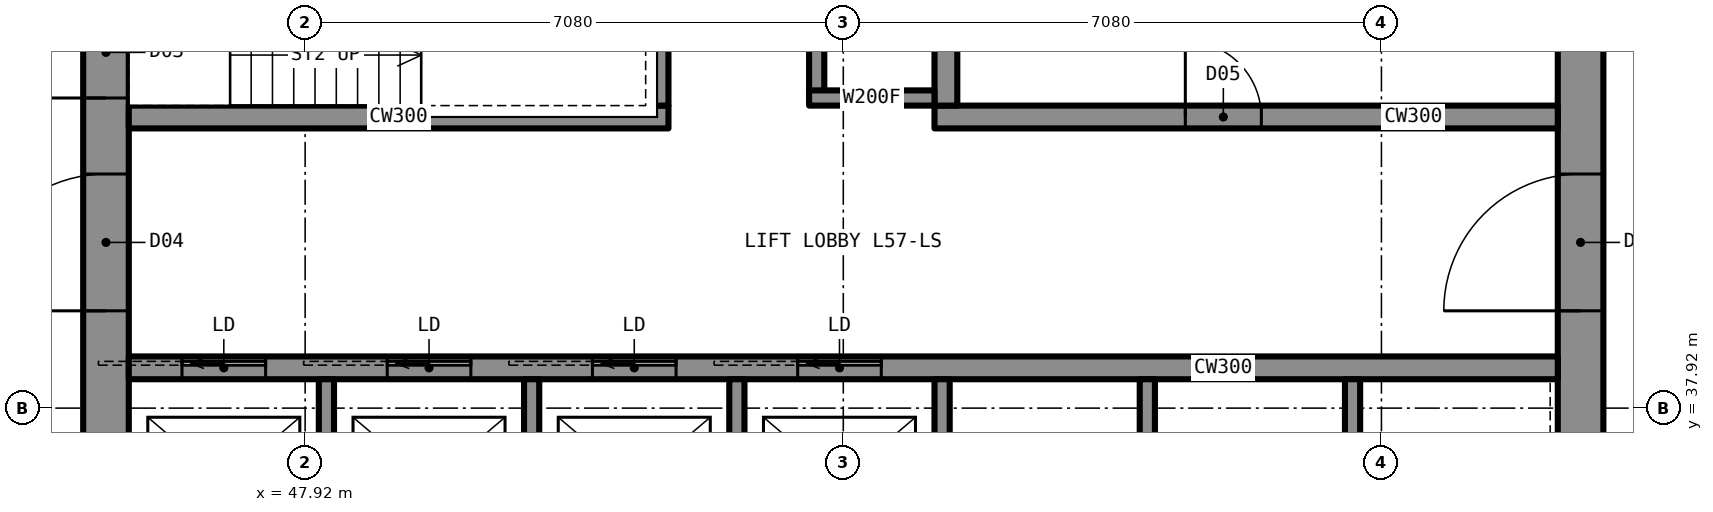
"""IFC4 building model, lengths in metres.
Left out: names, types, materials, properties, quantities, classifications, styles, units other than length and angle.
Written with IfcOpenShell. Run it as: python <this file> out.ifc"""

import sys

from ifc_helpers import new_model, si_unit, direction, frame, frame_2d, origin, place, context, subcontext, project, spatial, rectangle, extrude, element, fill, save


model = new_model("IFC4")
c1 = context("Model", 3, precision=1e-05, world=origin(), true_north=direction((0.0, 1.0)))
c2 = subcontext(c1, "Body", "Model", "MODEL_VIEW")
j1 = project(units=[si_unit("LENGTHUNIT", "METRE"), si_unit("PLANEANGLEUNIT", "RADIAN")], contexts=[c1])
p1 = place(None, origin())
s1 = spatial("IfcSite", under=j1, at=p1, CompositionType="ELEMENT")
p2 = place(p1, origin())
s2 = spatial("IfcBuilding", under=s1, at=p2, CompositionType="ELEMENT")
p3 = place(p2, frame((0.0, 0.0, 203.8)))
s3 = spatial("IfcBuildingStorey", under=s2, at=p3, CompositionType="ELEMENT", Elevation=203.8)
p4 = place(p3, frame((64.7, 35.6, 0.0), z_axis=(0.0, 0.0, 1.0), x_axis=(0.0, 1.0, 0.0)))
e1 = element("IfcWall", 1, at=p4, inside=s3, PredefinedType="SHEAR", context=c2, shape_type="SweptSolid", body=[
    extrude(rectangle(XDim=18.8, YDim=0.6, at=frame_2d((9.4, 0.0))), origin(), (0.0, 0.0, 1.0), 3.5),
])
p5 = place(p4, frame((13.4, 0.0, 0.0)))
e2 = element("IfcOpeningElement", 2, at=p5, cuts=e1, PredefinedType="OPENING", context=c2, shape_type="SweptSolid", body=[
    extrude(rectangle(XDim=1.8, YDim=2.2, at=frame_2d((0.9, 1.1))), frame((0.0, 0.31, 0.0), z_axis=(0.0, -1.0, 0.0), x_axis=(1.0, 0.0, 0.0)), (0.0, 0.0, 1.0), 0.62),
])
p6 = place(p4, frame((3.6, 0.0, 0.0)))
e3 = element("IfcOpeningElement", 3, at=p6, cuts=e1, PredefinedType="OPENING", context=c2, shape_type="SweptSolid", body=[
    extrude(rectangle(XDim=1.8, YDim=2.2, at=frame_2d((0.9, 1.1))), frame((0.0, 0.31, 0.0), z_axis=(0.0, -1.0, 0.0), x_axis=(1.0, 0.0, 0.0)), (0.0, 0.0, 1.0), 0.62),
])
p7 = place(p3, frame((45.3, 35.6, 0.0), z_axis=(0.0, 0.0, 1.0), x_axis=(0.0, 1.0, 0.0)))
e4 = element("IfcWall", 4, at=p7, inside=s3, PredefinedType="SHEAR", context=c2, shape_type="SweptSolid", body=[
    extrude(rectangle(XDim=18.8, YDim=0.6, at=frame_2d((9.4, 0.0))), origin(), (0.0, 0.0, 1.0), 3.5),
])
p8 = place(p7, frame((13.4, 0.0, 0.0)))
e5 = element("IfcOpeningElement", 5, at=p8, cuts=e4, PredefinedType="OPENING", context=c2, shape_type="SweptSolid", body=[
    extrude(rectangle(XDim=1.8, YDim=2.2, at=frame_2d((0.9, 1.1))), frame((0.0, 0.31, 0.0), z_axis=(0.0, -1.0, 0.0), x_axis=(1.0, 0.0, 0.0)), (0.0, 0.0, 1.0), 0.62),
])
p9 = place(p7, frame((3.6, 0.0, 0.0)))
e6 = element("IfcOpeningElement", 6, at=p9, cuts=e4, PredefinedType="OPENING", context=c2, shape_type="SweptSolid", body=[
    extrude(rectangle(XDim=1.8, YDim=2.2, at=frame_2d((0.9, 1.1))), frame((0.0, 0.31, 0.0), z_axis=(0.0, -1.0, 0.0), x_axis=(1.0, 0.0, 0.0)), (0.0, 0.0, 1.0), 0.62),
])
p10 = place(p7, frame((6.4, 0.0, 0.0)))
e7 = element("IfcOpeningElement", 7, at=p10, cuts=e4, PredefinedType="OPENING", context=c2, shape_type="SweptSolid", body=[
    extrude(rectangle(XDim=1.2, YDim=2.2, at=frame_2d((0.6, 1.1))), frame((0.0, 0.31, 0.0), z_axis=(0.0, -1.0, 0.0), x_axis=(1.0, 0.0, 0.0)), (0.0, 0.0, 1.0), 0.62),
])
p11 = place(p3, frame((45.6, 38.45, 0.0), z_axis=(0.0, 0.0, 1.0), x_axis=(1.0, 0.0, 0.0)))
e8 = element("IfcWall", 8, at=p11, inside=s3, PredefinedType="SHEAR", context=c2, shape_type="SweptSolid", body=[
    extrude(rectangle(XDim=18.8, YDim=0.3, at=frame_2d((9.4, 0.0))), origin(), (0.0, 0.0, 1.0), 3.5),
])
p12 = place(p11, frame((0.7, 0.0, 0.0)))
e9 = element("IfcOpeningElement", 9, at=p12, cuts=e8, PredefinedType="OPENING", context=c2, shape_type="SweptSolid", body=[
    extrude(rectangle(XDim=1.1, YDim=2.2, at=frame_2d((0.55, 1.1))), frame((0.0, 0.16, 0.0), z_axis=(0.0, -1.0, 0.0), x_axis=(1.0, 0.0, 0.0)), (0.0, 0.0, 1.0), 0.32),
])
p13 = place(p11, frame((3.4, 0.0, 0.0)))
e10 = element("IfcOpeningElement", 10, at=p13, cuts=e8, PredefinedType="OPENING", context=c2, shape_type="SweptSolid", body=[
    extrude(rectangle(XDim=1.1, YDim=2.2, at=frame_2d((0.55, 1.1))), frame((0.0, 0.16, 0.0), z_axis=(0.0, -1.0, 0.0), x_axis=(1.0, 0.0, 0.0)), (0.0, 0.0, 1.0), 0.32),
])
p14 = place(p11, frame((6.1, 0.0, 0.0)))
e11 = element("IfcOpeningElement", 11, at=p14, cuts=e8, PredefinedType="OPENING", context=c2, shape_type="SweptSolid", body=[
    extrude(rectangle(XDim=1.1, YDim=2.2, at=frame_2d((0.55, 1.1))), frame((0.0, 0.16, 0.0), z_axis=(0.0, -1.0, 0.0), x_axis=(1.0, 0.0, 0.0)), (0.0, 0.0, 1.0), 0.32),
])
p15 = place(p11, frame((8.8, 0.0, 0.0)))
e12 = element("IfcOpeningElement", 12, at=p15, cuts=e8, PredefinedType="OPENING", context=c2, shape_type="SweptSolid", body=[
    extrude(rectangle(XDim=1.1, YDim=2.2, at=frame_2d((0.55, 1.1))), frame((0.0, 0.16, 0.0), z_axis=(0.0, -1.0, 0.0), x_axis=(1.0, 0.0, 0.0)), (0.0, 0.0, 1.0), 0.32),
])
p16 = place(p3, frame((45.6, 41.75, 0.0), z_axis=(0.0, 0.0, 1.0), x_axis=(1.0, 0.0, 0.0)))
e13 = element("IfcWall", 13, at=p16, inside=s3, PredefinedType="SHEAR", context=c2, shape_type="SweptSolid", body=[
    extrude(rectangle(XDim=7.1, YDim=0.3, at=frame_2d((3.55, 0.0))), origin(), (0.0, 0.0, 1.0), 3.5),
])
p17 = place(p3, frame((56.2, 41.75, 0.0), z_axis=(0.0, 0.0, 1.0), x_axis=(1.0, 0.0, 0.0)))
e14 = element("IfcWall", 14, at=p17, inside=s3, PredefinedType="SHEAR", context=c2, shape_type="SweptSolid", body=[
    extrude(rectangle(XDim=8.2, YDim=0.3, at=frame_2d((4.1, 0.0))), origin(), (0.0, 0.0, 1.0), 3.5),
])
p18 = place(p17, frame((3.3, 0.0, 0.0)))
e15 = element("IfcOpeningElement", 15, at=p18, cuts=e14, PredefinedType="OPENING", context=c2, shape_type="SweptSolid", body=[
    extrude(rectangle(XDim=1.0, YDim=2.1, at=frame_2d((0.5, 1.05))), frame((0.0, 0.16, 0.0), z_axis=(0.0, -1.0, 0.0), x_axis=(1.0, 0.0, 0.0)), (0.0, 0.0, 1.0), 0.32),
])
p19 = place(p3, frame((52.55, 41.9, 0.0), z_axis=(0.0, 0.0, 1.0), x_axis=(0.0, 1.0, 0.0)))
e16 = element("IfcWall", 16, at=p19, inside=s3, PredefinedType="SHEAR", context=c2, shape_type="SweptSolid", body=[
    extrude(rectangle(XDim=6.2, YDim=0.3, at=frame_2d((3.1, 0.0))), origin(), (0.0, 0.0, 1.0), 3.5),
])
p20 = place(p19, frame((4.125, 0.0, 0.0)))
e17 = element("IfcOpeningElement", 17, at=p20, cuts=e16, PredefinedType="OPENING", context=c2, shape_type="SweptSolid", body=[
    extrude(rectangle(XDim=1.2, YDim=2.2, at=frame_2d((0.6, 1.1))), frame((0.0, 0.16, 0.0), z_axis=(0.0, -1.0, 0.0), x_axis=(1.0, 0.0, 0.0)), (0.0, 0.0, 1.0), 0.32),
])
p21 = place(p3, frame((56.35, 41.9, 0.0), z_axis=(0.0, 0.0, 1.0), x_axis=(0.0, 1.0, 0.0)))
e18 = element("IfcWall", 18, at=p21, inside=s3, PredefinedType="SHEAR", context=c2, shape_type="SweptSolid", body=[
    extrude(rectangle(XDim=9.5, YDim=0.3, at=frame_2d((4.75, 0.0))), origin(), (0.0, 0.0, 1.0), 3.5),
])
p22 = place(p21, frame((7.1, 0.0, 0.0)))
e19 = element("IfcOpeningElement", 19, at=p22, cuts=e18, PredefinedType="OPENING", context=c2, shape_type="SweptSolid", body=[
    extrude(rectangle(XDim=1.8, YDim=2.2, at=frame_2d((0.9, 1.1))), frame((0.0, 0.16, 0.0), z_axis=(0.0, -1.0, 0.0), x_axis=(1.0, 0.0, 0.0)), (0.0, 0.0, 1.0), 0.32),
])
for number, where, z_axis, x_axis in (
    (20, (48.2, 35.6, 0.0), (0.0, 0.0, 1.0), (0.0, 1.0, 0.0)),
    (21, (50.9, 35.6, 0.0), (0.0, 0.0, 1.0), (0.0, 1.0, 0.0)),
    (22, (53.6, 35.6, 0.0), (0.0, 0.0, 1.0), (0.0, 1.0, 0.0)),
    (23, (56.3, 35.6, 0.0), (0.0, 0.0, 1.0), (0.0, 1.0, 0.0)),
    (24, (59.0, 35.6, 0.0), (0.0, 0.0, 1.0), (0.0, 1.0, 0.0)),
    (25, (61.7, 35.6, 0.0), (0.0, 0.0, 1.0), (0.0, 1.0, 0.0)),
):
    element("IfcWall", number, at=place(p3, frame(where, z_axis=z_axis, x_axis=x_axis)), inside=s3, PredefinedType="PARTITIONING", context=c2, shape_type="SweptSolid", body=[
        extrude(rectangle(XDim=2.7, YDim=0.2, at=frame_2d((1.35, 0.0))), origin(), (0.0, 0.0, 1.0), 3.33),
    ])
p23 = place(p9, origin())
e26 = element("IfcDoor", 26, at=p23, inside=s3, OperationType="DOUBLE_DOOR_SINGLE_SWING", PredefinedType="DOOR", context=c2, shape_type="SweptSolid", body=[
    extrude(rectangle(XDim=1.8, YDim=2.2, at=frame_2d((0.9, 1.1))), frame((0.0, 0.025, 0.0), z_axis=(0.0, -1.0, 0.0), x_axis=(1.0, 0.0, 0.0)), (0.0, 0.0, 1.0), 0.05),
])
fill(e6, e26)
p24 = place(p6, origin())
e27 = element("IfcDoor", 27, at=p24, inside=s3, OperationType="DOUBLE_DOOR_SINGLE_SWING", PredefinedType="DOOR", context=c2, shape_type="SweptSolid", body=[
    extrude(rectangle(XDim=1.8, YDim=2.2, at=frame_2d((0.9, 1.1))), frame((0.0, 0.025, 0.0), z_axis=(0.0, -1.0, 0.0), x_axis=(1.0, 0.0, 0.0)), (0.0, 0.0, 1.0), 0.05),
])
fill(e3, e27)
p25 = place(p10, origin())
e28 = element("IfcDoor", 28, at=p25, inside=s3, OperationType="SINGLE_SWING_LEFT", PredefinedType="DOOR", context=c2, shape_type="SweptSolid", body=[
    extrude(rectangle(XDim=1.2, YDim=2.2, at=frame_2d((0.6, 1.1))), frame((0.0, 0.025, 0.0), z_axis=(0.0, -1.0, 0.0), x_axis=(1.0, 0.0, 0.0)), (0.0, 0.0, 1.0), 0.05),
])
fill(e7, e28)
p26 = place(p18, origin())
e29 = element("IfcDoor", 29, at=p26, inside=s3, OperationType="SINGLE_SWING_LEFT", PredefinedType="DOOR", context=c2, shape_type="SweptSolid", body=[
    extrude(rectangle(XDim=1.0, YDim=2.1, at=frame_2d((0.5, 1.05))), frame((0.0, 0.025, 0.0), z_axis=(0.0, -1.0, 0.0), x_axis=(1.0, 0.0, 0.0)), (0.0, 0.0, 1.0), 0.05),
])
fill(e15, e29)
p27 = place(p12, origin())
e30 = element("IfcDoor", 30, at=p27, inside=s3, OperationType="SLIDING_TO_LEFT", PredefinedType="DOOR", context=c2, shape_type="SweptSolid", body=[
    extrude(rectangle(XDim=1.1, YDim=2.2, at=frame_2d((0.55, 1.1))), frame((0.0, 0.025, 0.0), z_axis=(0.0, -1.0, 0.0), x_axis=(1.0, 0.0, 0.0)), (0.0, 0.0, 1.0), 0.05),
])
fill(e9, e30)
p28 = place(p13, origin())
e31 = element("IfcDoor", 31, at=p28, inside=s3, OperationType="SLIDING_TO_LEFT", PredefinedType="DOOR", context=c2, shape_type="SweptSolid", body=[
    extrude(rectangle(XDim=1.1, YDim=2.2, at=frame_2d((0.55, 1.1))), frame((0.0, 0.025, 0.0), z_axis=(0.0, -1.0, 0.0), x_axis=(1.0, 0.0, 0.0)), (0.0, 0.0, 1.0), 0.05),
])
fill(e10, e31)
p29 = place(p14, origin())
e32 = element("IfcDoor", 32, at=p29, inside=s3, OperationType="SLIDING_TO_LEFT", PredefinedType="DOOR", context=c2, shape_type="SweptSolid", body=[
    extrude(rectangle(XDim=1.1, YDim=2.2, at=frame_2d((0.55, 1.1))), frame((0.0, 0.025, 0.0), z_axis=(0.0, -1.0, 0.0), x_axis=(1.0, 0.0, 0.0)), (0.0, 0.0, 1.0), 0.05),
])
fill(e11, e32)
p30 = place(p15, origin())
e33 = element("IfcDoor", 33, at=p30, inside=s3, OperationType="SLIDING_TO_LEFT", PredefinedType="DOOR", context=c2, shape_type="SweptSolid", body=[
    extrude(rectangle(XDim=1.1, YDim=2.2, at=frame_2d((0.55, 1.1))), frame((0.0, 0.025, 0.0), z_axis=(0.0, -1.0, 0.0), x_axis=(1.0, 0.0, 0.0)), (0.0, 0.0, 1.0), 0.05),
])
fill(e12, e33)
save(model, sys.argv[1])
